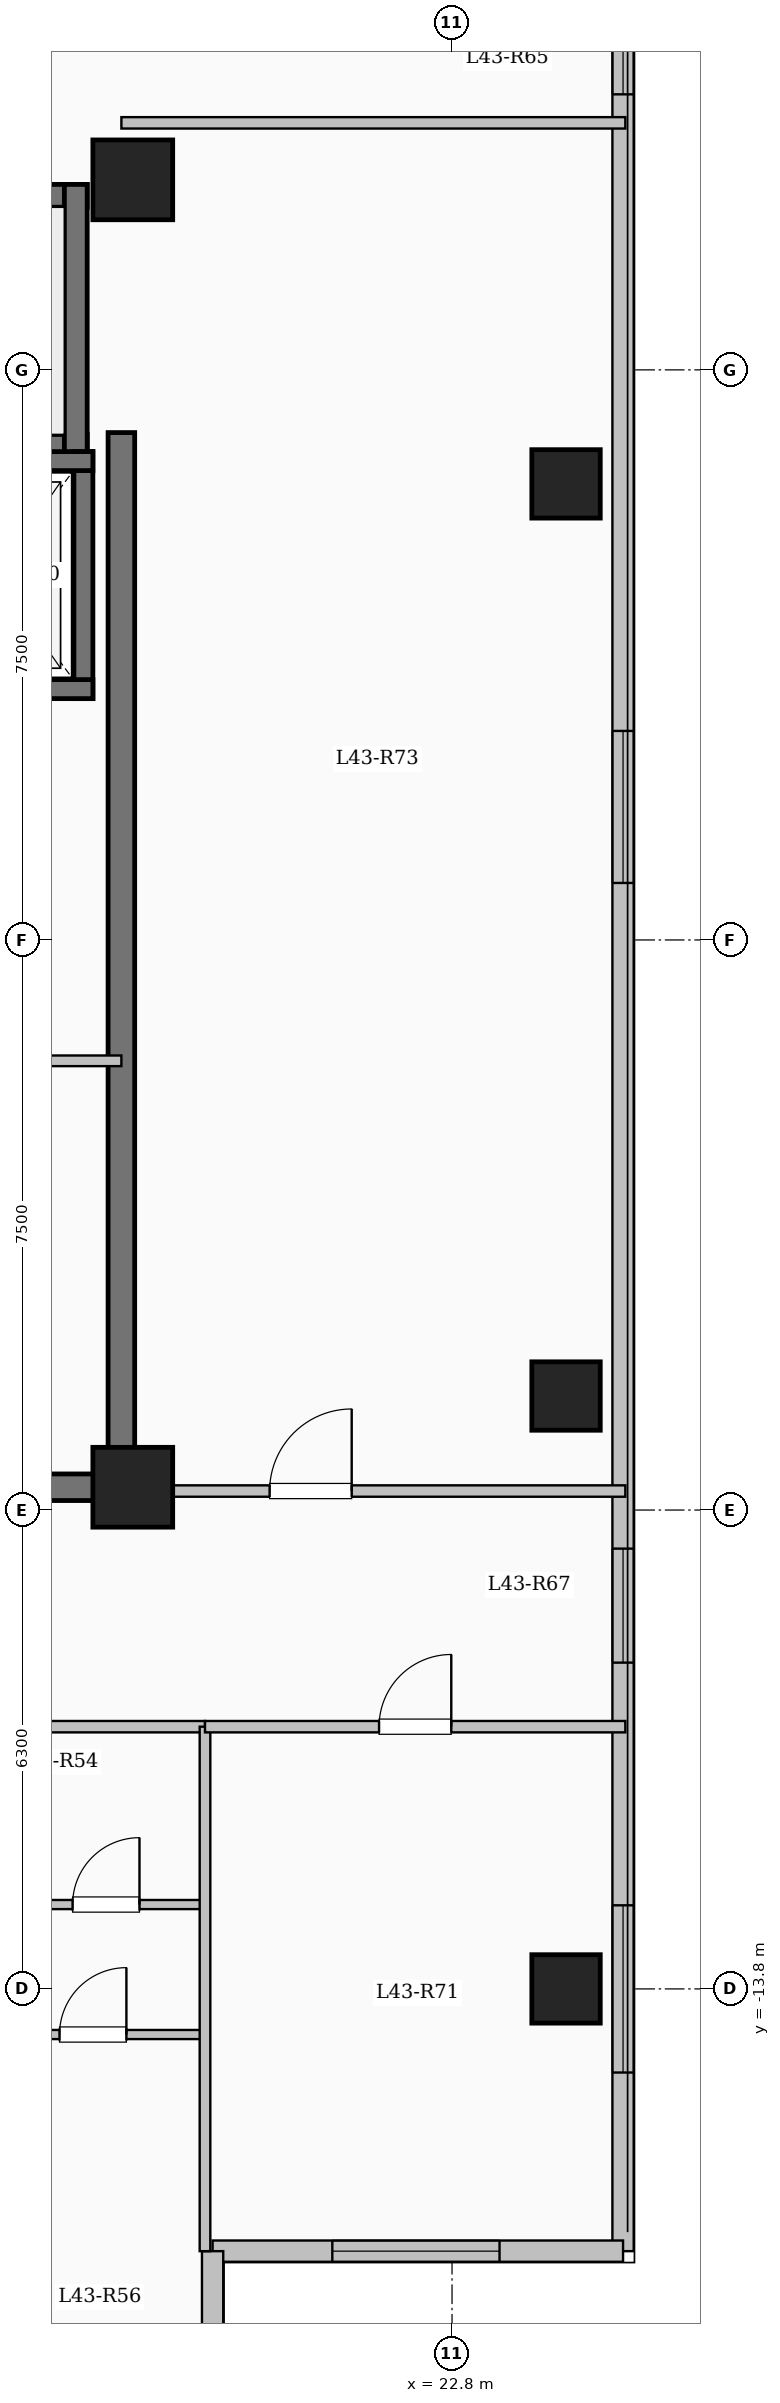
"""IFC4 building model, lengths in metres.
Left out: names, types, materials, properties, quantities, classifications, styles, units other than length and angle.
Written with IfcOpenShell. Run it as: python <this file> out.ifc"""

import sys

from ifc_helpers import new_model, si_unit, direction, frame, frame_2d, origin, origin_2d, place, context, subcontext, project, spatial, rectangle, extrude, element, fill, save


model = new_model("IFC4")
c1 = context("Model", 3, precision=1e-05, world=origin(), true_north=direction((0.0, 1.0)))
c2 = subcontext(c1, "Body", "Model", "MODEL_VIEW")
j1 = project(units=[si_unit("LENGTHUNIT", "METRE"), si_unit("PLANEANGLEUNIT", "RADIAN")], contexts=[c1])
p1 = place(None, origin())
s1 = spatial("IfcSite", under=j1, at=p1, CompositionType="ELEMENT")
p2 = place(p1, origin())
s2 = spatial("IfcBuilding", under=s1, at=p2, CompositionType="ELEMENT")
p3 = place(p2, frame((0.0, 0.0, 159.4)))
s3 = spatial("IfcBuildingStorey", under=s2, at=p3, CompositionType="ELEMENT", Elevation=159.4)
for number, where, z_axis, x_axis in (
    (1, (18.6, -7.2, 0.0), (0.0, 0.0, 1.0), (1.0, 0.0, 0.0)),
    (2, (18.6, 10.0, 0.0), (0.0, 0.0, 1.0), (1.0, 0.0, 0.0)),
):
    element("IfcColumn", number, at=place(p3, frame(where, z_axis=z_axis, x_axis=x_axis)), inside=s3, PredefinedType="COLUMN", context=c2, shape_type="SweptSolid", body=[
        extrude(rectangle(XDim=1.05, YDim=1.05, at=origin_2d()), origin(), (0.0, 0.0, 1.0), 3.35),
    ])
for number, where, z_axis, x_axis in (
    (3, (24.3, -13.8, 0.0), (0.0, 0.0, 1.0), (1.0, 0.0, 0.0)),
    (4, (24.3, -6.0, 0.0), (0.0, 0.0, 1.0), (1.0, 0.0, 0.0)),
    (5, (24.3, 6.0, 0.0), (0.0, 0.0, 1.0), (1.0, 0.0, 0.0)),
):
    element("IfcColumn", number, at=place(p3, frame(where, z_axis=z_axis, x_axis=x_axis)), inside=s3, PredefinedType="COLUMN", context=c2, shape_type="SweptSolid", body=[
        extrude(rectangle(XDim=0.9, YDim=0.9, at=origin_2d()), origin(), (0.0, 0.0, 1.0), 3.35),
    ])
p4 = place(p3, frame((25.05, 17.25, 0.0), z_axis=(0.0, 0.0, 1.0), x_axis=(0.0, -1.0, 0.0)))
e6 = element("IfcWall", 6, at=p4, inside=s3, PredefinedType="SOLIDWALL", context=c2, shape_type="SweptSolid", body=[
    extrude(rectangle(XDim=34.5, YDim=0.28, at=frame_2d((17.25, 0.0))), origin(), (0.0, 0.0, 1.0), 3.1),
])
p5 = place(p4, frame((1.375, 0.0, 0.9)))
e7 = element("IfcOpeningElement", 7, at=p5, cuts=e6, PredefinedType="OPENING", context=c2, shape_type="SweptSolid", body=[
    extrude(rectangle(XDim=2.0, YDim=1.7, at=frame_2d((1.0, 0.85))), frame((0.0, 0.15, 0.0), z_axis=(0.0, -1.0, 0.0), x_axis=(1.0, 0.0, 0.0)), (0.0, 0.0, 1.0), 0.3),
])
p6 = place(p4, frame((5.125, 0.0, 0.95)))
e8 = element("IfcOpeningElement", 8, at=p6, cuts=e6, PredefinedType="OPENING", context=c2, shape_type="SweptSolid", body=[
    extrude(rectangle(XDim=1.0, YDim=1.5, at=frame_2d((0.5, 0.75))), frame((0.0, 0.15, 0.0), z_axis=(0.0, -1.0, 0.0), x_axis=(1.0, 0.0, 0.0)), (0.0, 0.0, 1.0), 0.3),
])
p7 = place(p4, frame((14.5, 0.0, 0.9)))
e9 = element("IfcOpeningElement", 9, at=p7, cuts=e6, PredefinedType="OPENING", context=c2, shape_type="SweptSolid", body=[
    extrude(rectangle(XDim=2.0, YDim=1.7, at=frame_2d((1.0, 0.85))), frame((0.0, 0.15, 0.0), z_axis=(0.0, -1.0, 0.0), x_axis=(1.0, 0.0, 0.0)), (0.0, 0.0, 1.0), 0.3),
])
p8 = place(p4, frame((25.258, 0.0, 0.9)))
e10 = element("IfcOpeningElement", 10, at=p8, cuts=e6, PredefinedType="OPENING", context=c2, shape_type="SweptSolid", body=[
    extrude(rectangle(XDim=1.5, YDim=1.65, at=frame_2d((0.75, 0.825))), frame((0.0, 0.15, 0.0), z_axis=(0.0, -1.0, 0.0), x_axis=(1.0, 0.0, 0.0)), (0.0, 0.0, 1.0), 0.3),
])
p9 = place(p4, frame((29.95, 0.0, 0.9)))
e11 = element("IfcOpeningElement", 11, at=p9, cuts=e6, PredefinedType="OPENING", context=c2, shape_type="SweptSolid", body=[
    extrude(rectangle(XDim=2.2, YDim=1.75, at=frame_2d((1.1, 0.875))), frame((0.0, 0.15, 0.0), z_axis=(0.0, -1.0, 0.0), x_axis=(1.0, 0.0, 0.0)), (0.0, 0.0, 1.0), 0.3),
])
p10 = place(p3, frame((25.05, -17.25, 0.0), z_axis=(0.0, 0.0, 1.0), x_axis=(-1.0, 0.0, 0.0)))
e12 = element("IfcWall", 12, at=p10, inside=s3, PredefinedType="SOLIDWALL", context=c2, shape_type="SweptSolid", body=[
    extrude(rectangle(XDim=5.4, YDim=0.28, at=frame_2d((2.7, 0.0))), origin(), (0.0, 0.0, 1.0), 3.1),
])
p11 = place(p10, frame((1.625, 0.0, 0.9)))
e13 = element("IfcOpeningElement", 13, at=p11, cuts=e12, PredefinedType="OPENING", context=c2, shape_type="SweptSolid", body=[
    extrude(rectangle(XDim=2.2, YDim=1.75, at=frame_2d((1.1, 0.875))), frame((0.0, 0.15, 0.0), z_axis=(0.0, -1.0, 0.0), x_axis=(1.0, 0.0, 0.0)), (0.0, 0.0, 1.0), 0.3),
])
p12 = place(p3, frame((19.65, -17.25, 0.0), z_axis=(0.0, 0.0, 1.0), x_axis=(0.0, -1.0, 0.0)))
e14 = element("IfcWall", 14, at=p12, inside=s3, PredefinedType="SOLIDWALL", context=c2, shape_type="SweptSolid", body=[
    extrude(rectangle(XDim=3.9, YDim=0.28, at=frame_2d((1.95, 0.0))), origin(), (0.0, 0.0, 1.0), 3.1),
])
p13 = place(p12, frame((1.107, 0.0, 0.9)))
e15 = element("IfcOpeningElement", 15, at=p13, cuts=e14, PredefinedType="OPENING", context=c2, shape_type="SweptSolid", body=[
    extrude(rectangle(XDim=1.65, YDim=1.6, at=frame_2d((0.825, 0.8))), frame((0.0, 0.15, 0.0), z_axis=(0.0, -1.0, 0.0), x_axis=(1.0, 0.0, 0.0)), (0.0, 0.0, 1.0), 0.3),
])
p14 = place(p3, frame((10.0, 9.79, 0.0), z_axis=(0.0, 0.0, 1.0), x_axis=(1.0, 0.0, 0.0)))
e16 = element("IfcWall", 16, at=p14, inside=s3, PredefinedType="SHEAR", context=c2, shape_type="SweptSolid", body=[
    extrude(rectangle(XDim=8.0, YDim=0.3, at=frame_2d((4.0, 0.0))), origin(), (0.0, 0.0, 1.0), 3.35),
])
p15 = place(p3, frame((10.0, 6.5, 0.0), z_axis=(0.0, 0.0, 1.0), x_axis=(1.0, 0.0, 0.0)))
e17 = element("IfcWall", 17, at=p15, inside=s3, PredefinedType="SHEAR", context=c2, shape_type="SweptSolid", body=[
    extrude(rectangle(XDim=8.0, YDim=0.3, at=frame_2d((4.0, 0.0))), origin(), (0.0, 0.0, 1.0), 3.35),
])
p16 = place(p15, frame((0.55, 0.0, 0.0)))
e18 = element("IfcOpeningElement", 18, at=p16, cuts=e17, PredefinedType="OPENING", context=c2, shape_type="SweptSolid", body=[
    extrude(rectangle(XDim=1.0, YDim=2.15, at=frame_2d((0.5, 1.075))), frame((0.0, 0.16, 0.0), z_axis=(0.0, -1.0, 0.0), x_axis=(1.0, 0.0, 0.0)), (0.0, 0.0, 1.0), 0.32),
])
p17 = place(p3, frame((17.85, 6.35, 0.0), z_axis=(0.0, 0.0, 1.0), x_axis=(0.0, 1.0, 0.0)))
e19 = element("IfcWall", 19, at=p17, inside=s3, PredefinedType="SHEAR", context=c2, shape_type="SweptSolid", body=[
    extrude(rectangle(XDim=3.59, YDim=0.3, at=frame_2d((1.795, 0.0))), origin(), (0.0, 0.0, 1.0), 3.35),
])
p18 = place(p3, frame((17.95, 3.175, 0.0), z_axis=(0.0, 0.0, 1.0), x_axis=(0.0, 1.0, 0.0)))
e20 = element("IfcWall", 20, at=p18, inside=s3, PredefinedType="SHEAR", context=c2, shape_type="SweptSolid", body=[
    extrude(rectangle(XDim=3.25, YDim=0.25, at=frame_2d((1.625, 0.0))), origin(), (0.0, 0.0, 1.0), 3.35),
])
for number, where, z_axis, x_axis in (
    (21, (15.525, 3.3, 0.0), (0.0, 0.0, 1.0), (1.0, 0.0, 0.0)),
    (22, (15.525, 6.3, 0.0), (0.0, 0.0, 1.0), (1.0, 0.0, 0.0)),
):
    element("IfcWall", number, at=place(p3, frame(where, z_axis=z_axis, x_axis=x_axis)), inside=s3, PredefinedType="SHEAR", context=c2, shape_type="SweptSolid", body=[
        extrude(rectangle(XDim=2.55, YDim=0.25, at=frame_2d((1.275, 0.0))), origin(), (0.0, 0.0, 1.0), 3.35),
    ])
p19 = place(p3, frame((18.45, -7.375, 0.0), z_axis=(0.0, 0.0, 1.0), x_axis=(0.0, 1.0, 0.0)))
e23 = element("IfcWall", 23, at=p19, inside=s3, PredefinedType="SHEAR", context=c2, shape_type="SweptSolid", body=[
    extrude(rectangle(XDim=14.05, YDim=0.35, at=frame_2d((7.025, 0.0))), origin(), (0.0, 0.0, 1.0), 3.35),
])
p20 = place(p3, frame((10.075, -7.2, 0.0), z_axis=(0.0, 0.0, 1.0), x_axis=(1.0, 0.0, 0.0)))
e24 = element("IfcWall", 24, at=p20, inside=s3, PredefinedType="SHEAR", context=c2, shape_type="SweptSolid", body=[
    extrude(rectangle(XDim=8.55, YDim=0.35, at=frame_2d((4.275, 0.0))), origin(), (0.0, 0.0, 1.0), 3.35),
])
p21 = place(p3, frame((15.4, -1.59, 0.0), z_axis=(0.0, 0.0, 1.0), x_axis=(1.0, 0.0, 0.0)))
e25 = element("IfcWall", 25, at=p21, inside=s3, PredefinedType="PARTITIONING", context=c2, shape_type="SweptSolid", body=[
    extrude(rectangle(XDim=3.05, YDim=0.14, at=frame_2d((1.525, 0.0))), origin(), (0.0, 0.0, 1.0), 3.1),
])
p22 = place(p21, frame((1.05, 0.0, 0.0)))
e26 = element("IfcOpeningElement", 26, at=p22, cuts=e25, PredefinedType="OPENING", context=c2, shape_type="SweptSolid", body=[
    extrude(rectangle(XDim=0.9, YDim=2.08, at=frame_2d((0.45, 1.04))), frame((0.0, 0.08, 0.0), z_axis=(0.0, -1.0, 0.0), x_axis=(1.0, 0.0, 0.0)), (0.0, 0.0, 1.0), 0.16),
])
p23 = place(p3, frame((8.55, -10.35, 0.0), z_axis=(0.0, 0.0, 1.0), x_axis=(1.0, 0.0, 0.0)))
e27 = element("IfcWall", 27, at=p23, inside=s3, PredefinedType="PARTITIONING", context=c2, shape_type="SweptSolid", body=[
    extrude(rectangle(XDim=11.0, YDim=0.15, at=frame_2d((5.5, 0.0))), origin(), (0.0, 0.0, 1.0), 3.1),
])
p24 = place(p23, frame((0.75, 0.0, 0.0)))
e28 = element("IfcOpeningElement", 28, at=p24, cuts=e27, PredefinedType="OPENING", context=c2, shape_type="SweptSolid", body=[
    extrude(rectangle(XDim=0.96, YDim=2.15, at=frame_2d((0.48, 1.075))), frame((0.0, 0.085, 0.0), z_axis=(0.0, -1.0, 0.0), x_axis=(1.0, 0.0, 0.0)), (0.0, 0.0, 1.0), 0.17),
])
p25 = place(p3, frame((16.945, -12.69, 0.0), z_axis=(0.0, 0.0, 1.0), x_axis=(1.0, 0.0, 0.0)))
e29 = element("IfcWall", 29, at=p25, inside=s3, PredefinedType="PARTITIONING", context=c2, shape_type="SweptSolid", body=[
    extrude(rectangle(XDim=2.605, YDim=0.12, at=frame_2d((1.302, 0.0))), origin(), (0.0, 0.0, 1.0), 3.1),
])
p26 = place(p25, frame((0.863, 0.0, 0.0)))
e30 = element("IfcOpeningElement", 30, at=p26, cuts=e29, PredefinedType="OPENING", context=c2, shape_type="SweptSolid", body=[
    extrude(rectangle(XDim=0.88, YDim=2.1, at=frame_2d((0.44, 1.05))), frame((0.0, 0.07, 0.0), z_axis=(0.0, -1.0, 0.0), x_axis=(1.0, 0.0, 0.0)), (0.0, 0.0, 1.0), 0.14),
])
p27 = place(p3, frame((14.015, -14.4, 0.0), z_axis=(0.0, 0.0, 1.0), x_axis=(1.0, 0.0, 0.0)))
e31 = element("IfcWall", 31, at=p27, inside=s3, PredefinedType="PARTITIONING", context=c2, shape_type="SweptSolid", body=[
    extrude(rectangle(XDim=5.595, YDim=0.12, at=frame_2d((2.798, 0.0))), origin(), (0.0, 0.0, 1.0), 3.1),
])
p28 = place(p27, frame((0.914, 0.0, 0.0)))
e32 = element("IfcOpeningElement", 32, at=p28, cuts=e31, PredefinedType="OPENING", context=c2, shape_type="SweptSolid", body=[
    extrude(rectangle(XDim=0.88, YDim=2.1, at=frame_2d((0.44, 1.05))), frame((0.0, 0.07, 0.0), z_axis=(0.0, -1.0, 0.0), x_axis=(1.0, 0.0, 0.0)), (0.0, 0.0, 1.0), 0.14),
])
p29 = place(p27, frame((3.621, 0.0, 0.0)))
e33 = element("IfcOpeningElement", 33, at=p29, cuts=e31, PredefinedType="OPENING", context=c2, shape_type="SweptSolid", body=[
    extrude(rectangle(XDim=0.88, YDim=2.1, at=frame_2d((0.44, 1.05))), frame((0.0, 0.07, 0.0), z_axis=(0.0, -1.0, 0.0), x_axis=(1.0, 0.0, 0.0)), (0.0, 0.0, 1.0), 0.14),
])
p30 = place(p3, frame((18.45, -7.25, 0.0), z_axis=(0.0, 0.0, 1.0), x_axis=(1.0, 0.0, 0.0)))
e34 = element("IfcWall", 34, at=p30, inside=s3, PredefinedType="PARTITIONING", context=c2, shape_type="SweptSolid", body=[
    extrude(rectangle(XDim=6.63, YDim=0.15, at=frame_2d((3.315, 0.0))), origin(), (0.0, 0.0, 1.0), 3.1),
])
p31 = place(p30, frame((1.95, 0.0, 0.0)))
e35 = element("IfcOpeningElement", 35, at=p31, cuts=e34, PredefinedType="OPENING", context=c2, shape_type="SweptSolid", body=[
    extrude(rectangle(XDim=1.08, YDim=2.15, at=frame_2d((0.54, 1.075))), frame((0.0, 0.085, 0.0), z_axis=(0.0, -1.0, 0.0), x_axis=(1.0, 0.0, 0.0)), (0.0, 0.0, 1.0), 0.17),
])
p32 = place(p3, frame((18.45, 10.75, 0.0), z_axis=(0.0, 0.0, 1.0), x_axis=(1.0, 0.0, 0.0)))
e36 = element("IfcWall", 36, at=p32, inside=s3, PredefinedType="PARTITIONING", context=c2, shape_type="SweptSolid", body=[
    extrude(rectangle(XDim=6.63, YDim=0.15, at=frame_2d((3.315, 0.0))), origin(), (0.0, 0.0, 1.0), 3.1),
])
p33 = place(p3, frame((19.55, -17.25, 0.0), z_axis=(0.0, 0.0, 1.0), x_axis=(0.0, 1.0, 0.0)))
e37 = element("IfcWall", 37, at=p33, inside=s3, PredefinedType="PARTITIONING", context=c2, shape_type="SweptSolid", body=[
    extrude(rectangle(XDim=6.9, YDim=0.14, at=frame_2d((3.45, 0.0))), origin(), (0.0, 0.0, 1.0), 3.1),
])
p34 = place(p3, frame((19.55, -10.35, 0.0), z_axis=(0.0, 0.0, 1.0), x_axis=(1.0, 0.0, 0.0)))
e38 = element("IfcWall", 38, at=p34, inside=s3, PredefinedType="PARTITIONING", context=c2, shape_type="SweptSolid", body=[
    extrude(rectangle(XDim=5.53, YDim=0.15, at=frame_2d((2.765, 0.0))), origin(), (0.0, 0.0, 1.0), 3.1),
])
p35 = place(p34, frame((2.29, 0.0, 0.0)))
e39 = element("IfcOpeningElement", 39, at=p35, cuts=e38, PredefinedType="OPENING", context=c2, shape_type="SweptSolid", body=[
    extrude(rectangle(XDim=0.95, YDim=2.15, at=frame_2d((0.475, 1.075))), frame((0.0, 0.085, 0.0), z_axis=(0.0, -1.0, 0.0), x_axis=(1.0, 0.0, 0.0)), (0.0, 0.0, 1.0), 0.17),
])
p36 = place(p6, origin())
e40 = element("IfcWindow", 40, at=p36, inside=s3, PartitioningType="SINGLE_PANEL", PredefinedType="WINDOW", context=c2, shape_type="SweptSolid", body=[
    extrude(rectangle(XDim=1.0, YDim=1.5, at=frame_2d((0.5, 0.75))), frame((0.0, 0.03, 0.0), z_axis=(0.0, -1.0, 0.0), x_axis=(1.0, 0.0, 0.0)), (0.0, 0.0, 1.0), 0.06),
])
fill(e8, e40)
p37 = place(p7, origin())
e41 = element("IfcWindow", 41, at=p37, inside=s3, PartitioningType="SINGLE_PANEL", PredefinedType="WINDOW", context=c2, shape_type="SweptSolid", body=[
    extrude(rectangle(XDim=2.0, YDim=1.7, at=frame_2d((1.0, 0.85))), frame((0.0, 0.03, 0.0), z_axis=(0.0, -1.0, 0.0), x_axis=(1.0, 0.0, 0.0)), (0.0, 0.0, 1.0), 0.06),
])
fill(e9, e41)
p38 = place(p8, origin())
e42 = element("IfcWindow", 42, at=p38, inside=s3, PartitioningType="SINGLE_PANEL", PredefinedType="WINDOW", context=c2, shape_type="SweptSolid", body=[
    extrude(rectangle(XDim=1.5, YDim=1.65, at=frame_2d((0.75, 0.825))), frame((0.0, 0.03, 0.0), z_axis=(0.0, -1.0, 0.0), x_axis=(1.0, 0.0, 0.0)), (0.0, 0.0, 1.0), 0.06),
])
fill(e10, e42)
p39 = place(p9, origin())
e43 = element("IfcWindow", 43, at=p39, inside=s3, PartitioningType="SINGLE_PANEL", PredefinedType="WINDOW", context=c2, shape_type="SweptSolid", body=[
    extrude(rectangle(XDim=2.2, YDim=1.75, at=frame_2d((1.1, 0.875))), frame((0.0, 0.03, 0.0), z_axis=(0.0, -1.0, 0.0), x_axis=(1.0, 0.0, 0.0)), (0.0, 0.0, 1.0), 0.06),
])
fill(e11, e43)
p40 = place(p11, origin())
e44 = element("IfcWindow", 44, at=p40, inside=s3, PartitioningType="SINGLE_PANEL", PredefinedType="WINDOW", context=c2, shape_type="SweptSolid", body=[
    extrude(rectangle(XDim=2.2, YDim=1.75, at=frame_2d((1.1, 0.875))), frame((0.0, 0.03, 0.0), z_axis=(0.0, -1.0, 0.0), x_axis=(1.0, 0.0, 0.0)), (0.0, 0.0, 1.0), 0.06),
])
fill(e13, e44)
p41 = place(p26, origin())
e45 = element("IfcDoor", 45, at=p41, inside=s3, OperationType="SINGLE_SWING_RIGHT", PredefinedType="DOOR", context=c2, shape_type="SweptSolid", body=[
    extrude(rectangle(XDim=0.88, YDim=2.1, at=frame_2d((0.44, 1.05))), frame((0.0, 0.025, 0.0), z_axis=(0.0, -1.0, 0.0), x_axis=(1.0, 0.0, 0.0)), (0.0, 0.0, 1.0), 0.05),
])
fill(e30, e45)
p42 = place(p29, origin())
e46 = element("IfcDoor", 46, at=p42, inside=s3, OperationType="SINGLE_SWING_RIGHT", PredefinedType="DOOR", context=c2, shape_type="SweptSolid", body=[
    extrude(rectangle(XDim=0.88, YDim=2.1, at=frame_2d((0.44, 1.05))), frame((0.0, 0.025, 0.0), z_axis=(0.0, -1.0, 0.0), x_axis=(1.0, 0.0, 0.0)), (0.0, 0.0, 1.0), 0.05),
])
fill(e33, e46)
p43 = place(p35, origin())
e47 = element("IfcDoor", 47, at=p43, inside=s3, OperationType="SINGLE_SWING_RIGHT", PredefinedType="DOOR", context=c2, shape_type="SweptSolid", body=[
    extrude(rectangle(XDim=0.95, YDim=2.15, at=frame_2d((0.475, 1.075))), frame((0.0, 0.025, 0.0), z_axis=(0.0, -1.0, 0.0), x_axis=(1.0, 0.0, 0.0)), (0.0, 0.0, 1.0), 0.05),
])
fill(e39, e47)
p44 = place(p31, origin())
e48 = element("IfcDoor", 48, at=p44, inside=s3, OperationType="SINGLE_SWING_RIGHT", PredefinedType="DOOR", context=c2, shape_type="SweptSolid", body=[
    extrude(rectangle(XDim=1.08, YDim=2.15, at=frame_2d((0.54, 1.075))), frame((0.0, 0.025, 0.0), z_axis=(0.0, -1.0, 0.0), x_axis=(1.0, 0.0, 0.0)), (0.0, 0.0, 1.0), 0.05),
])
fill(e35, e48)
save(model, sys.argv[1])
